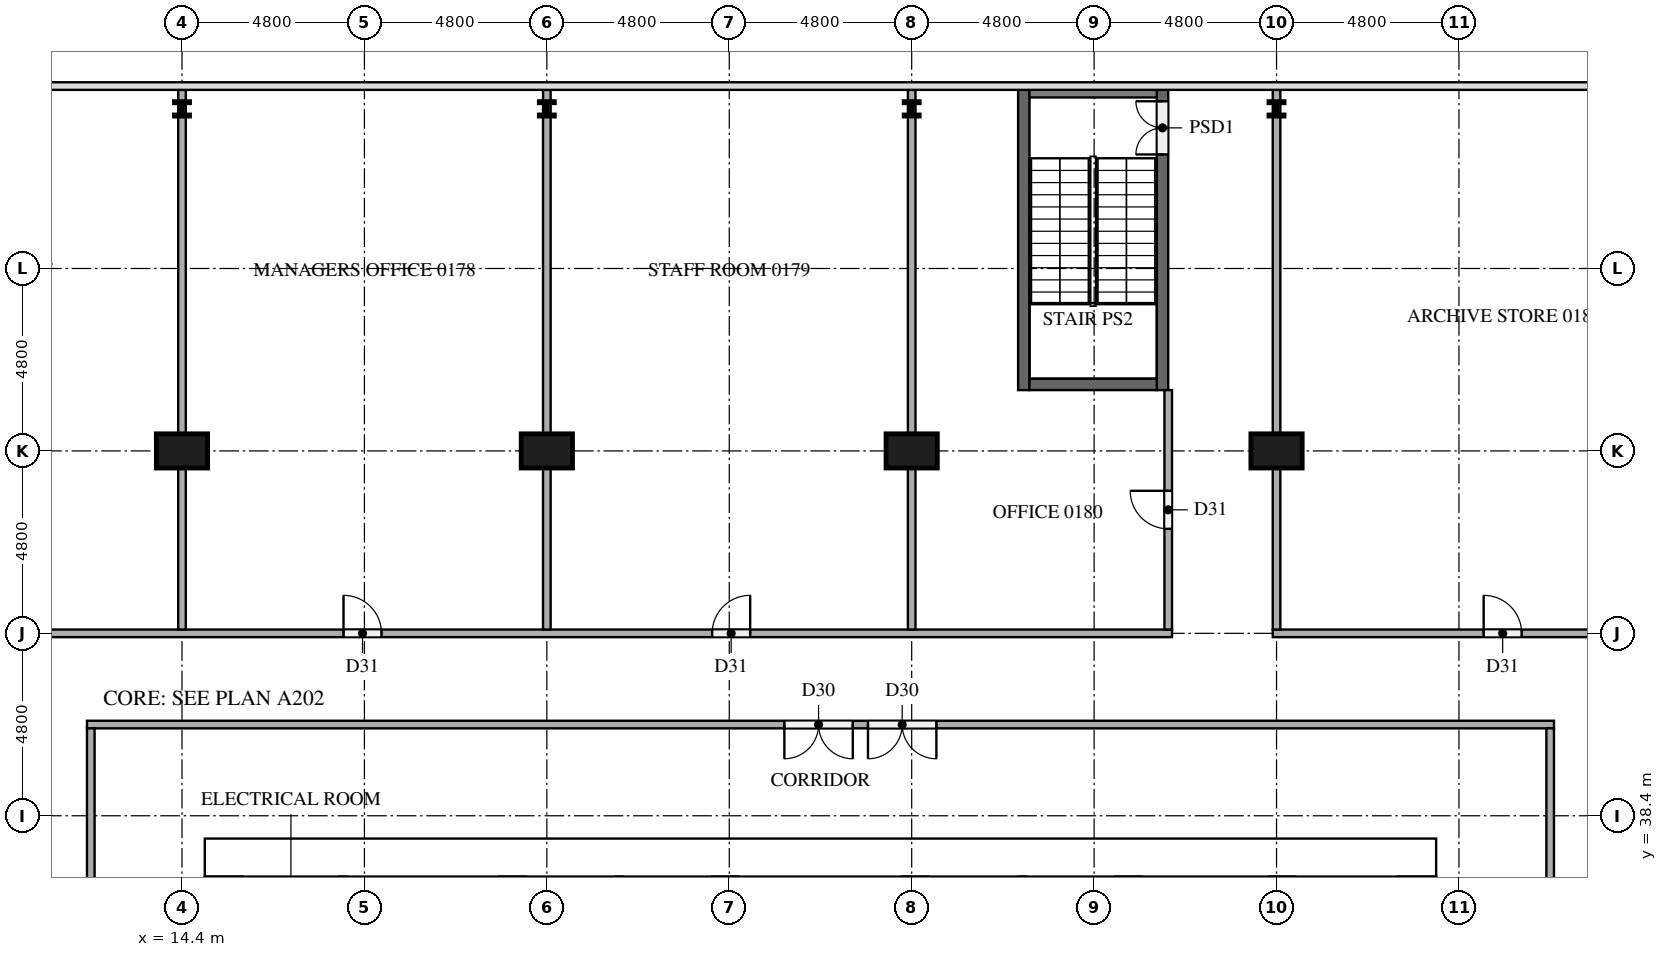
"""IFC4 building model, lengths in metres.
Left out: names, types, materials, properties, quantities, classifications, styles, units other than length and angle.
Written with IfcOpenShell. Run it as: python <this file> out.ifc"""

import sys

from ifc_helpers import new_model, si_unit, direction, frame, frame_2d, origin, origin_2d, place, context, subcontext, project, spatial, rectangle, i_section, extrude, element, fill, save


model = new_model("IFC4")
c1 = context("Model", 3, precision=1e-05, world=origin(), true_north=direction((0.0, 1.0)))
c2 = subcontext(c1, "Body", "Model", "MODEL_VIEW")
j1 = project(units=[si_unit("LENGTHUNIT", "METRE"), si_unit("PLANEANGLEUNIT", "RADIAN")], contexts=[c1])
p1 = place(None, origin())
s1 = spatial("IfcSite", under=j1, at=p1, CompositionType="ELEMENT")
p2 = place(p1, origin())
s2 = spatial("IfcBuilding", under=s1, at=p2, CompositionType="ELEMENT")
p3 = place(p2, frame((0.0, 0.0, 6.0)))
s3 = spatial("IfcBuildingStorey", under=s2, at=p3, CompositionType="ELEMENT", Elevation=6.0)
p4 = place(p3, frame((36.55, 49.6, 0.0), z_axis=(0.0, 0.0, 1.0), x_axis=(0.0, 1.0, 0.0)))
e1 = element("IfcWall", 1, at=p4, inside=s3, PredefinedType="SOLIDWALL", context=c2, shape_type="SweptSolid", body=[
    extrude(rectangle(XDim=8.0, YDim=0.3, at=frame_2d((4.0, 0.0))), origin(), (0.0, 0.0, 1.0), 4.2),
])
p5 = place(p3, frame((40.2, 49.6, 0.0), z_axis=(0.0, 0.0, 1.0), x_axis=(0.0, 1.0, 0.0)))
e2 = element("IfcWall", 2, at=p5, inside=s3, PredefinedType="SOLIDWALL", context=c2, shape_type="SweptSolid", body=[
    extrude(rectangle(XDim=8.0, YDim=0.3, at=frame_2d((4.0, 0.0))), origin(), (0.0, 0.0, 1.0), 4.2),
])
p6 = place(p5, frame((6.2, 0.0, 0.0)))
e3 = element("IfcOpeningElement", 3, at=p6, cuts=e2, PredefinedType="OPENING", context=c2, shape_type="SweptSolid", body=[
    extrude(rectangle(XDim=1.4, YDim=2.1, at=frame_2d((0.7, 1.05))), frame((0.0, 0.16, 0.0), z_axis=(0.0, -1.0, 0.0), x_axis=(1.0, 0.0, 0.0)), (0.0, 0.0, 1.0), 0.32),
])
for number, where, z_axis, x_axis in (
    (4, (36.7, 49.75, 0.0), (0.0, 0.0, 1.0), (1.0, 0.0, 0.0)),
    (5, (36.7, 57.45, 0.0), (0.0, 0.0, 1.0), (1.0, 0.0, 0.0)),
):
    element("IfcWall", number, at=place(p3, frame(where, z_axis=z_axis, x_axis=x_axis)), inside=s3, PredefinedType="SOLIDWALL", context=c2, shape_type="SweptSolid", body=[
        extrude(rectangle(XDim=3.35, YDim=0.3, at=frame_2d((1.675, 0.0))), origin(), (0.0, 0.0, 1.0), 4.2),
    ])
p7 = place(p3, frame((15.0, 37.3, 0.0), z_axis=(0.0, 0.0, 1.0), x_axis=(1.0, 0.0, 0.0)))
e6 = element("IfcWall", 6, at=p7, inside=s3, PredefinedType="SHEAR", context=c2, shape_type="SweptSolid", body=[
    extrude(rectangle(XDim=32.4, YDim=1.0, at=frame_2d((16.2, 0.0))), origin(), (0.0, 0.0, 1.0), 4.2),
])
p8 = place(p7, frame((15.3, 0.0, 0.0)))
e7 = element("IfcOpeningElement", 7, at=p8, cuts=e6, PredefinedType="OPENING", context=c2, shape_type="SweptSolid", body=[
    extrude(rectangle(XDim=1.8, YDim=2.1, at=frame_2d((0.9, 1.05))), frame((0.0, 0.51, 0.0), z_axis=(0.0, -1.0, 0.0), x_axis=(1.0, 0.0, 0.0)), (0.0, 0.0, 1.0), 1.02),
])
p9 = place(p7, frame((1.766, 0.0, 0.0)))
e8 = element("IfcOpeningElement", 8, at=p9, cuts=e6, PredefinedType="OPENING", context=c2, shape_type="SweptSolid", body=[
    extrude(rectangle(XDim=1.0, YDim=2.1, at=frame_2d((0.5, 1.05))), frame((0.0, 0.51, 0.0), z_axis=(0.0, -1.0, 0.0), x_axis=(1.0, 0.0, 0.0)), (0.0, 0.0, 1.0), 1.02),
])
p10 = place(p7, frame((5.241, 0.0, 0.0)))
e9 = element("IfcOpeningElement", 9, at=p10, cuts=e6, PredefinedType="OPENING", context=c2, shape_type="SweptSolid", body=[
    extrude(rectangle(XDim=1.0, YDim=2.1, at=frame_2d((0.5, 1.05))), frame((0.0, 0.51, 0.0), z_axis=(0.0, -1.0, 0.0), x_axis=(1.0, 0.0, 0.0)), (0.0, 0.0, 1.0), 1.02),
])
for number, where, z_axis, x_axis in (
    (10, (28.7, 33.9, 0.0), (0.0, 0.0, 1.0), (0.0, 1.0, 0.0)),
    (11, (33.7, 33.9, 0.0), (0.0, 0.0, 1.0), (0.0, 1.0, 0.0)),
):
    element("IfcWall", number, at=place(p3, frame(where, z_axis=z_axis, x_axis=x_axis)), inside=s3, PredefinedType="SHEAR", context=c2, shape_type="SweptSolid", body=[
        extrude(rectangle(XDim=2.9, YDim=0.7, at=frame_2d((1.45, 0.0))), origin(), (0.0, 0.0, 1.0), 4.2),
    ])
for number, where, z_axis, x_axis in (
    (12, (43.2, 48.0, 0.0), (0.0, 0.0, 1.0), (1.0, 0.0, 0.0)),
    (13, (33.6, 48.0, 0.0), (0.0, 0.0, 1.0), (1.0, 0.0, 0.0)),
    (14, (24.0, 48.0, 0.0), (0.0, 0.0, 1.0), (1.0, 0.0, 0.0)),
    (15, (14.4, 48.0, 0.0), (0.0, 0.0, 1.0), (1.0, 0.0, 0.0)),
):
    element("IfcColumn", number, at=place(p3, frame(where, z_axis=z_axis, x_axis=x_axis)), inside=s3, PredefinedType="COLUMN", context=c2, shape_type="SweptSolid", body=[
        extrude(rectangle(XDim=1.35, YDim=0.9, at=origin_2d()), origin(), (0.0, 0.0, 1.0), 4.2),
    ])
for number, where, z_axis, x_axis in (
    (16, (14.4, 57.0, 0.0), (0.0, 0.0, 1.0), (1.0, 0.0, 0.0)),
    (17, (24.0, 57.0, 0.0), (0.0, 0.0, 1.0), (1.0, 0.0, 0.0)),
    (18, (33.6, 57.0, 0.0), (0.0, 0.0, 1.0), (1.0, 0.0, 0.0)),
    (19, (43.2, 57.0, 0.0), (0.0, 0.0, 1.0), (1.0, 0.0, 0.0)),
):
    element("IfcColumn", number, at=place(p3, frame(where, z_axis=z_axis, x_axis=x_axis)), inside=s3, PredefinedType="COLUMN", context=c2, shape_type="SweptSolid", body=[
        extrude(i_section(OverallWidth=0.396, OverallDepth=0.381, WebThickness=0.019, FlangeThickness=0.03, at=origin_2d()), origin(), (0.0, 0.0, 1.0), 4.2),
    ])
for number, where, z_axis, x_axis in (
    (20, (25.9, 33.9, 0.0), (0.0, 0.0, 1.0), (0.0, 1.0, 0.0)),
    (21, (36.5, 33.9, 0.0), (0.0, 0.0, 1.0), (0.0, 1.0, 0.0)),
):
    element("IfcWall", number, at=place(p3, frame(where, z_axis=z_axis, x_axis=x_axis)), inside=s3, PredefinedType="SOLIDWALL", context=c2, shape_type="SweptSolid", body=[
        extrude(rectangle(XDim=2.9, YDim=0.2, at=frame_2d((1.45, 0.0))), origin(), (0.0, 0.0, 1.0), 4.2),
    ])
p11 = place(p3, frame((18.633, 31.6, 0.0), z_axis=(0.0, 0.0, 1.0), x_axis=(0.0, 1.0, 0.0)))
e22 = element("IfcWall", 22, at=p11, inside=s3, PredefinedType="PARTITIONING", context=c2, shape_type="SweptSolid", body=[
    extrude(rectangle(XDim=5.2, YDim=0.2, at=frame_2d((2.6, 0.0))), origin(), (0.0, 0.0, 1.0), 4.2),
])
p12 = place(p3, frame((50.5, 40.8, 0.0), z_axis=(0.0, 0.0, 1.0), x_axis=(-1.0, 0.0, 0.0)))
e23 = element("IfcWall", 23, at=p12, inside=s3, PredefinedType="PARTITIONING", context=c2, shape_type="SweptSolid", body=[
    extrude(rectangle(XDim=38.6, YDim=0.2, at=frame_2d((19.3, 0.0))), origin(), (0.0, 0.0, 1.0), 4.2),
])
p13 = place(p12, frame((18.45, 0.0, 0.0)))
e24 = element("IfcOpeningElement", 24, at=p13, cuts=e23, PredefinedType="OPENING", context=c2, shape_type="SweptSolid", body=[
    extrude(rectangle(XDim=1.8, YDim=2.1, at=frame_2d((0.9, 1.05))), frame((0.0, 0.11, 0.0), z_axis=(0.0, -1.0, 0.0), x_axis=(1.0, 0.0, 0.0)), (0.0, 0.0, 1.0), 0.22),
])
p14 = place(p12, frame((16.25, 0.0, 0.0)))
e25 = element("IfcOpeningElement", 25, at=p14, cuts=e23, PredefinedType="OPENING", context=c2, shape_type="SweptSolid", body=[
    extrude(rectangle(XDim=1.8, YDim=2.1, at=frame_2d((0.9, 1.05))), frame((0.0, 0.11, 0.0), z_axis=(0.0, -1.0, 0.0), x_axis=(1.0, 0.0, 0.0)), (0.0, 0.0, 1.0), 0.22),
])
p15 = place(p3, frame((-4.9, 43.2, 0.0), z_axis=(0.0, 0.0, 1.0), x_axis=(1.0, 0.0, 0.0)))
e26 = element("IfcWall", 26, at=p15, inside=s3, PredefinedType="PARTITIONING", context=c2, shape_type="SweptSolid", body=[
    extrude(rectangle(XDim=45.35, YDim=0.2, at=frame_2d((22.675, 0.0))), origin(), (0.0, 0.0, 1.0), 4.2),
])
p16 = place(p15, frame((14.05, 0.0, 0.0)))
e27 = element("IfcOpeningElement", 27, at=p16, cuts=e26, PredefinedType="OPENING", context=c2, shape_type="SweptSolid", body=[
    extrude(rectangle(XDim=1.0, YDim=2.1, at=frame_2d((0.5, 1.05))), frame((0.0, 0.11, 0.0), z_axis=(0.0, -1.0, 0.0), x_axis=(1.0, 0.0, 0.0)), (0.0, 0.0, 1.0), 0.22),
])
p17 = place(p15, frame((23.55, 0.0, 0.0)))
e28 = element("IfcOpeningElement", 28, at=p17, cuts=e26, PredefinedType="OPENING", context=c2, shape_type="SweptSolid", body=[
    extrude(rectangle(XDim=1.0, YDim=2.1, at=frame_2d((0.5, 1.05))), frame((0.0, 0.11, 0.0), z_axis=(0.0, -1.0, 0.0), x_axis=(1.0, 0.0, 0.0)), (0.0, 0.0, 1.0), 0.22),
])
p18 = place(p15, frame((33.25, 0.0, 0.0)))
e29 = element("IfcOpeningElement", 29, at=p18, cuts=e26, PredefinedType="OPENING", context=c2, shape_type="SweptSolid", body=[
    extrude(rectangle(XDim=1.0, YDim=2.1, at=frame_2d((0.5, 1.05))), frame((0.0, 0.11, 0.0), z_axis=(0.0, -1.0, 0.0), x_axis=(1.0, 0.0, 0.0)), (0.0, 0.0, 1.0), 0.22),
])
p19 = place(p3, frame((43.1, 43.2, 0.0), z_axis=(0.0, 0.0, 1.0), x_axis=(1.0, 0.0, 0.0)))
e30 = element("IfcWall", 30, at=p19, inside=s3, PredefinedType="PARTITIONING", context=c2, shape_type="SweptSolid", body=[
    extrude(rectangle(XDim=24.2, YDim=0.2, at=frame_2d((12.1, 0.0))), origin(), (0.0, 0.0, 1.0), 4.2),
])
p20 = place(p19, frame((5.55, 0.0, 0.0)))
e31 = element("IfcOpeningElement", 31, at=p20, cuts=e30, PredefinedType="OPENING", context=c2, shape_type="SweptSolid", body=[
    extrude(rectangle(XDim=1.0, YDim=2.1, at=frame_2d((0.5, 1.05))), frame((0.0, 0.11, 0.0), z_axis=(0.0, -1.0, 0.0), x_axis=(1.0, 0.0, 0.0)), (0.0, 0.0, 1.0), 0.22),
])
p21 = place(p19, frame((15.15, 0.0, 0.0)))
e32 = element("IfcOpeningElement", 32, at=p21, cuts=e30, PredefinedType="OPENING", context=c2, shape_type="SweptSolid", body=[
    extrude(rectangle(XDim=1.0, YDim=2.1, at=frame_2d((0.5, 1.05))), frame((0.0, 0.11, 0.0), z_axis=(0.0, -1.0, 0.0), x_axis=(1.0, 0.0, 0.0)), (0.0, 0.0, 1.0), 0.22),
])
p22 = place(p19, frame((21.25, 0.0, 0.0)))
e33 = element("IfcOpeningElement", 33, at=p22, cuts=e30, PredefinedType="OPENING", context=c2, shape_type="SweptSolid", body=[
    extrude(rectangle(XDim=1.0, YDim=2.1, at=frame_2d((0.5, 1.05))), frame((0.0, 0.11, 0.0), z_axis=(0.0, -1.0, 0.0), x_axis=(1.0, 0.0, 0.0)), (0.0, 0.0, 1.0), 0.22),
])
p23 = place(p3, frame((12.0, 40.7, 0.0), z_axis=(0.0, 0.0, 1.0), x_axis=(0.0, -1.0, 0.0)))
e34 = element("IfcWall", 34, at=p23, inside=s3, PredefinedType="PARTITIONING", context=c2, shape_type="SweptSolid", body=[
    extrude(rectangle(XDim=28.6, YDim=0.2, at=frame_2d((14.3, 0.0))), origin(), (0.0, 0.0, 1.0), 4.2),
])
p24 = place(p23, frame((6.85, 0.0, 0.0)))
e35 = element("IfcOpeningElement", 35, at=p24, cuts=e34, PredefinedType="OPENING", context=c2, shape_type="SweptSolid", body=[
    extrude(rectangle(XDim=1.8, YDim=2.1, at=frame_2d((0.9, 1.05))), frame((0.0, 0.11, 0.0), z_axis=(0.0, -1.0, 0.0), x_axis=(1.0, 0.0, 0.0)), (0.0, 0.0, 1.0), 0.22),
])
for number, where, z_axis, x_axis in (
    (36, (14.4, 43.3, 0.0), (0.0, 0.0, 1.0), (0.0, 1.0, 0.0)),
    (37, (24.0, 43.3, 0.0), (0.0, 0.0, 1.0), (0.0, 1.0, 0.0)),
    (38, (33.6, 43.3, 0.0), (0.0, 0.0, 1.0), (0.0, 1.0, 0.0)),
):
    element("IfcWall", number, at=place(p3, frame(where, z_axis=z_axis, x_axis=x_axis)), inside=s3, PredefinedType="PARTITIONING", context=c2, shape_type="SweptSolid", body=[
        extrude(rectangle(XDim=14.2, YDim=0.2, at=frame_2d((7.1, 0.0))), origin(), (0.0, 0.0, 1.0), 4.2),
    ])
p25 = place(p3, frame((40.35, 43.3, 0.0), z_axis=(0.0, 0.0, 1.0), x_axis=(0.0, 1.0, 0.0)))
e39 = element("IfcWall", 39, at=p25, inside=s3, PredefinedType="PARTITIONING", context=c2, shape_type="SweptSolid", body=[
    extrude(rectangle(XDim=6.3, YDim=0.2, at=frame_2d((3.15, 0.0))), origin(), (0.0, 0.0, 1.0), 4.2),
])
p26 = place(p25, frame((2.65, 0.0, 0.0)))
e40 = element("IfcOpeningElement", 40, at=p26, cuts=e39, PredefinedType="OPENING", context=c2, shape_type="SweptSolid", body=[
    extrude(rectangle(XDim=1.0, YDim=2.1, at=frame_2d((0.5, 1.05))), frame((0.0, 0.11, 0.0), z_axis=(0.0, -1.0, 0.0), x_axis=(1.0, 0.0, 0.0)), (0.0, 0.0, 1.0), 0.22),
])
p27 = place(p3, frame((43.2, 43.3, 0.0), z_axis=(0.0, 0.0, 1.0), x_axis=(0.0, 1.0, 0.0)))
e41 = element("IfcWall", 41, at=p27, inside=s3, PredefinedType="PARTITIONING", context=c2, shape_type="SweptSolid", body=[
    extrude(rectangle(XDim=14.2, YDim=0.2, at=frame_2d((7.1, 0.0))), origin(), (0.0, 0.0, 1.0), 4.2),
])
p28 = place(p3, frame((50.4, 12.1, 0.0), z_axis=(0.0, 0.0, 1.0), x_axis=(0.0, 1.0, 0.0)))
e42 = element("IfcWall", 42, at=p28, inside=s3, PredefinedType="PARTITIONING", context=c2, shape_type="SweptSolid", body=[
    extrude(rectangle(XDim=28.6, YDim=0.2, at=frame_2d((14.3, 0.0))), origin(), (0.0, 0.0, 1.0), 4.2),
])
p29 = place(p28, frame((20.05, 0.0, 0.0)))
e43 = element("IfcOpeningElement", 43, at=p29, cuts=e42, PredefinedType="OPENING", context=c2, shape_type="SweptSolid", body=[
    extrude(rectangle(XDim=1.8, YDim=2.1, at=frame_2d((0.9, 1.05))), frame((0.0, 0.11, 0.0), z_axis=(0.0, -1.0, 0.0), x_axis=(1.0, 0.0, 0.0)), (0.0, 0.0, 1.0), 0.22),
])
p30 = place(p8, origin())
e44 = element("IfcDoor", 44, at=p30, inside=s3, OperationType="DOUBLE_DOOR_SINGLE_SWING", PredefinedType="DOOR", context=c2, shape_type="SweptSolid", body=[
    extrude(rectangle(XDim=1.8, YDim=2.1, at=frame_2d((0.9, 1.05))), frame((0.0, 0.025, 0.0), z_axis=(0.0, -1.0, 0.0), x_axis=(1.0, 0.0, 0.0)), (0.0, 0.0, 1.0), 0.05),
])
fill(e7, e44)
p31 = place(p9, origin())
e45 = element("IfcDoor", 45, at=p31, inside=s3, OperationType="SINGLE_SWING_RIGHT", PredefinedType="DOOR", context=c2, shape_type="SweptSolid", body=[
    extrude(rectangle(XDim=1.0, YDim=2.1, at=frame_2d((0.5, 1.05))), frame((0.0, 0.025, 0.0), z_axis=(0.0, -1.0, 0.0), x_axis=(1.0, 0.0, 0.0)), (0.0, 0.0, 1.0), 0.05),
])
fill(e8, e45)
p32 = place(p10, origin())
e46 = element("IfcDoor", 46, at=p32, inside=s3, OperationType="SINGLE_SWING_LEFT", PredefinedType="DOOR", context=c2, shape_type="SweptSolid", body=[
    extrude(rectangle(XDim=1.0, YDim=2.1, at=frame_2d((0.5, 1.05))), frame((0.0, 0.025, 0.0), z_axis=(0.0, -1.0, 0.0), x_axis=(1.0, 0.0, 0.0)), (0.0, 0.0, 1.0), 0.05),
])
fill(e9, e46)
p33 = place(p6, origin())
e47 = element("IfcDoor", 47, at=p33, inside=s3, OperationType="DOUBLE_DOOR_SINGLE_SWING", PredefinedType="DOOR", context=c2, shape_type="SweptSolid", body=[
    extrude(rectangle(XDim=1.4, YDim=2.1, at=frame_2d((0.7, 1.05))), frame((0.0, 0.025, 0.0), z_axis=(0.0, -1.0, 0.0), x_axis=(1.0, 0.0, 0.0)), (0.0, 0.0, 1.0), 0.05),
])
fill(e3, e47)
p34 = place(p13, origin())
e48 = element("IfcDoor", 48, at=p34, inside=s3, OperationType="DOUBLE_DOOR_SINGLE_SWING", PredefinedType="DOOR", context=c2, shape_type="SweptSolid", body=[
    extrude(rectangle(XDim=1.8, YDim=2.1, at=frame_2d((0.9, 1.05))), frame((0.0, 0.025, 0.0), z_axis=(0.0, -1.0, 0.0), x_axis=(1.0, 0.0, 0.0)), (0.0, 0.0, 1.0), 0.05),
])
fill(e24, e48)
p35 = place(p17, origin())
e49 = element("IfcDoor", 49, at=p35, inside=s3, OperationType="SINGLE_SWING_LEFT", PredefinedType="DOOR", context=c2, shape_type="SweptSolid", body=[
    extrude(rectangle(XDim=1.0, YDim=2.1, at=frame_2d((0.5, 1.05))), frame((0.0, 0.025, 0.0), z_axis=(0.0, -1.0, 0.0), x_axis=(1.0, 0.0, 0.0)), (0.0, 0.0, 1.0), 0.05),
])
fill(e28, e49)
p36 = place(p18, origin())
e50 = element("IfcDoor", 50, at=p36, inside=s3, OperationType="SINGLE_SWING_RIGHT", PredefinedType="DOOR", context=c2, shape_type="SweptSolid", body=[
    extrude(rectangle(XDim=1.0, YDim=2.1, at=frame_2d((0.5, 1.05))), frame((0.0, 0.025, 0.0), z_axis=(0.0, -1.0, 0.0), x_axis=(1.0, 0.0, 0.0)), (0.0, 0.0, 1.0), 0.05),
])
fill(e29, e50)
p37 = place(p26, origin())
e51 = element("IfcDoor", 51, at=p37, inside=s3, OperationType="SINGLE_SWING_RIGHT", PredefinedType="DOOR", context=c2, shape_type="SweptSolid", body=[
    extrude(rectangle(XDim=1.0, YDim=2.1, at=frame_2d((0.5, 1.05))), frame((0.0, 0.025, 0.0), z_axis=(0.0, -1.0, 0.0), x_axis=(1.0, 0.0, 0.0)), (0.0, 0.0, 1.0), 0.05),
])
fill(e40, e51)
p38 = place(p20, origin())
e52 = element("IfcDoor", 52, at=p38, inside=s3, OperationType="SINGLE_SWING_LEFT", PredefinedType="DOOR", context=c2, shape_type="SweptSolid", body=[
    extrude(rectangle(XDim=1.0, YDim=2.1, at=frame_2d((0.5, 1.05))), frame((0.0, 0.025, 0.0), z_axis=(0.0, -1.0, 0.0), x_axis=(1.0, 0.0, 0.0)), (0.0, 0.0, 1.0), 0.05),
])
fill(e31, e52)
p39 = place(p14, origin())
e53 = element("IfcDoor", 53, at=p39, inside=s3, OperationType="DOUBLE_DOOR_SINGLE_SWING", PredefinedType="DOOR", context=c2, shape_type="SweptSolid", body=[
    extrude(rectangle(XDim=1.8, YDim=2.1, at=frame_2d((0.9, 1.05))), frame((0.0, 0.025, 0.0), z_axis=(0.0, -1.0, 0.0), x_axis=(1.0, 0.0, 0.0)), (0.0, 0.0, 1.0), 0.05),
])
fill(e25, e53)
save(model, sys.argv[1])
